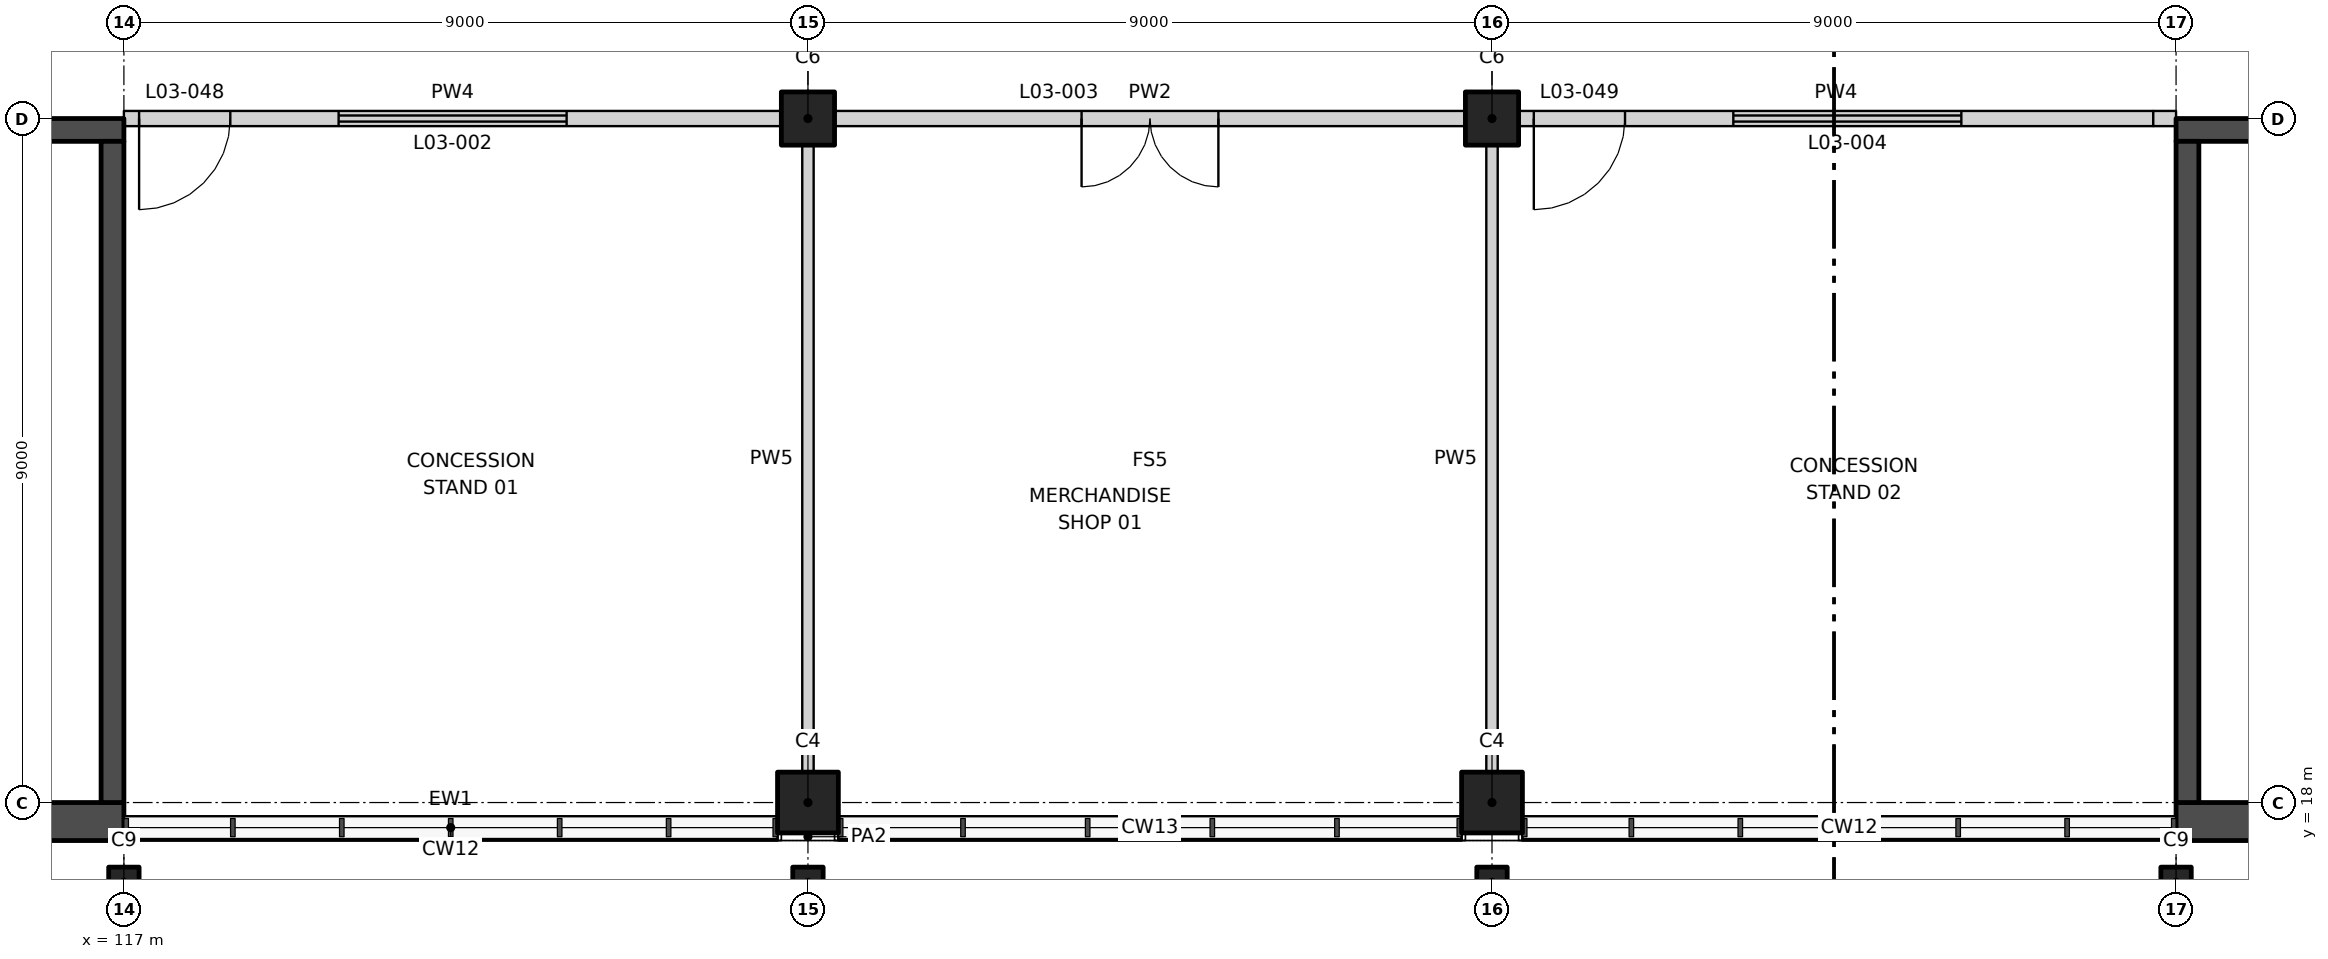
"""IFC4 building model, lengths in metres.
Left out: names, types, materials, properties, quantities, classifications, styles, units other than length and angle.
Written with IfcOpenShell. Run it as: python <this file> out.ifc"""

import sys

from ifc_helpers import new_model, si_unit, direction, frame, frame_2d, origin, origin_2d, place, context, subcontext, project, spatial, rectangle, hollow_rectangle, extrude, element, fill, save


model = new_model("IFC4")
c1 = context("Model", 3, precision=1e-05, world=origin(), true_north=direction((0.0, 1.0)))
c2 = subcontext(c1, "Body", "Model", "MODEL_VIEW")
j1 = project(units=[si_unit("LENGTHUNIT", "METRE"), si_unit("PLANEANGLEUNIT", "RADIAN")], contexts=[c1])
p1 = place(None, origin())
s1 = spatial("IfcSite", under=j1, at=p1, CompositionType="ELEMENT")
p2 = place(p1, origin())
s2 = spatial("IfcBuilding", under=s1, at=p2, CompositionType="ELEMENT")
p3 = place(p2, frame((0.0, 0.0, 22.0)))
s3 = spatial("IfcBuildingStorey", under=s2, at=p3, CompositionType="ELEMENT", Elevation=22.0)
for number, where, z_axis, x_axis in (
    (1, (126.0, 18.0, 0.0), (0.0, 0.0, 1.0), (1.0, 0.0, 0.0)),
    (2, (135.0, 18.0, 0.0), (0.0, 0.0, 1.0), (1.0, 0.0, 0.0)),
):
    element("IfcColumn", number, at=place(p3, frame(where, z_axis=z_axis, x_axis=x_axis)), inside=s3, PredefinedType="COLUMN", context=c2, shape_type="SweptSolid", body=[
        extrude(rectangle(XDim=0.8, YDim=0.8, at=origin_2d()), origin(), (0.0, 0.0, 1.0), 6.0),
    ])
for number, where, z_axis, x_axis in (
    (3, (126.0, 27.0, 0.0), (0.0, 0.0, 1.0), (1.0, 0.0, 0.0)),
    (4, (135.0, 27.0, 0.0), (0.0, 0.0, 1.0), (1.0, 0.0, 0.0)),
):
    element("IfcColumn", number, at=place(p3, frame(where, z_axis=z_axis, x_axis=x_axis)), inside=s3, PredefinedType="COLUMN", context=c2, shape_type="SweptSolid", body=[
        extrude(rectangle(XDim=0.7, YDim=0.7, at=origin_2d()), origin(), (0.0, 0.0, 1.0), 6.0),
    ])
p4 = place(p3, frame((117.0, 27.0, 0.0), z_axis=(0.0, 0.0, 1.0), x_axis=(1.0, 0.0, 0.0)))
e5 = element("IfcWall", 5, at=p4, inside=s3, PredefinedType="PARTITIONING", context=c2, shape_type="SweptSolid", body=[
    extrude(rectangle(XDim=8.65, YDim=0.2, at=frame_2d((4.325, 0.0))), origin(), (0.0, 0.0, 1.0), 4.8),
])
p5 = place(p4, frame((2.825, 0.0, 0.0)))
e6 = element("IfcOpeningElement", 6, at=p5, cuts=e5, PredefinedType="OPENING", context=c2, shape_type="SweptSolid", body=[
    extrude(rectangle(XDim=3.0, YDim=2.4, at=frame_2d((1.5, 1.2))), frame((0.0, 0.11, 0.0), z_axis=(0.0, -1.0, 0.0), x_axis=(1.0, 0.0, 0.0)), (0.0, 0.0, 1.0), 0.22),
])
p6 = place(p4, frame((0.2, 0.0, 0.0)))
e7 = element("IfcOpeningElement", 7, at=p6, cuts=e5, PredefinedType="OPENING", context=c2, shape_type="SweptSolid", body=[
    extrude(rectangle(XDim=1.2, YDim=2.1, at=frame_2d((0.6, 1.05))), frame((0.0, 0.11, 0.0), z_axis=(0.0, -1.0, 0.0), x_axis=(1.0, 0.0, 0.0)), (0.0, 0.0, 1.0), 0.22),
])
p7 = place(p3, frame((126.35, 27.0, 0.0), z_axis=(0.0, 0.0, 1.0), x_axis=(1.0, 0.0, 0.0)))
e8 = element("IfcWall", 8, at=p7, inside=s3, PredefinedType="PARTITIONING", context=c2, shape_type="SweptSolid", body=[
    extrude(rectangle(XDim=8.3, YDim=0.2, at=frame_2d((4.15, 0.0))), origin(), (0.0, 0.0, 1.0), 4.8),
])
p8 = place(p7, frame((3.25, 0.0, 0.0)))
e9 = element("IfcOpeningElement", 9, at=p8, cuts=e8, PredefinedType="OPENING", context=c2, shape_type="SweptSolid", body=[
    extrude(rectangle(XDim=1.8, YDim=2.1, at=frame_2d((0.9, 1.05))), frame((0.0, 0.11, 0.0), z_axis=(0.0, -1.0, 0.0), x_axis=(1.0, 0.0, 0.0)), (0.0, 0.0, 1.0), 0.22),
])
p9 = place(p3, frame((135.35, 27.0, 0.0), z_axis=(0.0, 0.0, 1.0), x_axis=(1.0, 0.0, 0.0)))
e10 = element("IfcWall", 10, at=p9, inside=s3, PredefinedType="PARTITIONING", context=c2, shape_type="SweptSolid", body=[
    extrude(rectangle(XDim=8.35, YDim=0.2, at=frame_2d((4.175, 0.0))), origin(), (0.0, 0.0, 1.0), 4.8),
])
p10 = place(p9, frame((2.825, 0.0, 0.0)))
e11 = element("IfcOpeningElement", 11, at=p10, cuts=e10, PredefinedType="OPENING", context=c2, shape_type="SweptSolid", body=[
    extrude(rectangle(XDim=3.0, YDim=2.4, at=frame_2d((1.5, 1.2))), frame((0.0, 0.11, 0.0), z_axis=(0.0, -1.0, 0.0), x_axis=(1.0, 0.0, 0.0)), (0.0, 0.0, 1.0), 0.22),
])
p11 = place(p9, frame((0.2, 0.0, 0.0)))
e12 = element("IfcOpeningElement", 12, at=p11, cuts=e10, PredefinedType="OPENING", context=c2, shape_type="SweptSolid", body=[
    extrude(rectangle(XDim=1.2, YDim=2.1, at=frame_2d((0.6, 1.05))), frame((0.0, 0.11, 0.0), z_axis=(0.0, -1.0, 0.0), x_axis=(1.0, 0.0, 0.0)), (0.0, 0.0, 1.0), 0.22),
])
for number, where, z_axis, x_axis in (
    (13, (126.0, 18.4, 0.0), (0.0, 0.0, 1.0), (0.0, 1.0, 0.0)),
    (14, (135.0, 18.4, 0.0), (0.0, 0.0, 1.0), (0.0, 1.0, 0.0)),
):
    element("IfcWall", number, at=place(p3, frame(where, z_axis=z_axis, x_axis=x_axis)), inside=s3, PredefinedType="PARTITIONING", context=c2, shape_type="SweptSolid", body=[
        extrude(rectangle(XDim=8.25, YDim=0.15, at=frame_2d((4.125, 0.0))), origin(), (0.0, 0.0, 1.0), 4.8),
    ])
p12 = place(p3, frame((117.0, 17.65, 0.0), z_axis=(0.0, 0.0, 1.0), x_axis=(1.0, 0.0, 0.0)))
e15 = element("IfcWall", 15, at=p12, inside=s3, PredefinedType="SOLIDWALL", context=c2, shape_type="SweptSolid", body=[
    extrude(rectangle(XDim=8.6, YDim=0.3, at=frame_2d((4.3, 0.0))), origin(), (0.0, 0.0, 1.0), 1.0),
])
p13 = place(p3, frame((126.4, 17.65, 0.0), z_axis=(0.0, 0.0, 1.0), x_axis=(1.0, 0.0, 0.0)))
e16 = element("IfcWall", 16, at=p13, inside=s3, PredefinedType="SOLIDWALL", context=c2, shape_type="SweptSolid", body=[
    extrude(rectangle(XDim=8.2, YDim=0.3, at=frame_2d((4.1, 0.0))), origin(), (0.0, 0.0, 1.0), 1.0),
])
p14 = place(p3, frame((135.4, 17.65, 0.0), z_axis=(0.0, 0.0, 1.0), x_axis=(1.0, 0.0, 0.0)))
e17 = element("IfcWall", 17, at=p14, inside=s3, PredefinedType="SOLIDWALL", context=c2, shape_type="SweptSolid", body=[
    extrude(rectangle(XDim=8.6, YDim=0.3, at=frame_2d((4.3, 0.0))), origin(), (0.0, 0.0, 1.0), 1.0),
])
for number, where, z_axis, x_axis in (
    (18, (117.0, 16.95, 0.0), (0.0, 0.0, 1.0), (1.0, 0.0, 0.0)),
    (19, (126.0, 16.95, 0.0), (0.0, 0.0, 1.0), (1.0, 0.0, 0.0)),
    (20, (135.0, 16.95, 0.0), (0.0, 0.0, 1.0), (1.0, 0.0, 0.0)),
    (21, (144.0, 16.95, 0.0), (0.0, 0.0, 1.0), (1.0, 0.0, 0.0)),
):
    element("IfcColumn", number, at=place(p3, frame(where, z_axis=z_axis, x_axis=x_axis)), inside=s3, PredefinedType="COLUMN", context=c2, shape_type="SweptSolid", body=[
        extrude(hollow_rectangle(XDim=0.4, YDim=0.4, WallThickness=0.016, at=origin_2d()), origin(), (0.0, 0.0, 1.0), 5.7),
    ])
p15 = place(p3, frame((117.0, 26.85, 0.0), z_axis=(0.0, 0.0, 1.0), x_axis=(-1.0, 0.0, 0.0)))
e22 = element("IfcWall", 22, at=p15, inside=s3, PredefinedType="SHEAR", context=c2, shape_type="SweptSolid", body=[
    extrude(rectangle(XDim=18.0, YDim=0.3, at=frame_2d((9.0, 0.0))), origin(), (0.0, 0.0, 1.0), 6.0),
])
p16 = place(p15, frame((8.6, 0.0, 0.0)))
e23 = element("IfcOpeningElement", 23, at=p16, cuts=e22, PredefinedType="OPENING", context=c2, shape_type="SweptSolid", body=[
    extrude(rectangle(XDim=1.2, YDim=2.1, at=frame_2d((0.6, 1.05))), frame((0.0, 0.16, 0.0), z_axis=(0.0, -1.0, 0.0), x_axis=(1.0, 0.0, 0.0)), (0.0, 0.0, 1.0), 0.32),
])
p17 = place(p3, frame((117.0, 17.75, 0.0), z_axis=(0.0, 0.0, 1.0), x_axis=(-1.0, 0.0, 0.0)))
e24 = element("IfcWall", 24, at=p17, inside=s3, PredefinedType="SHEAR", context=c2, shape_type="SweptSolid", body=[
    extrude(rectangle(XDim=18.0, YDim=0.5, at=frame_2d((9.0, 0.0))), origin(), (0.0, 0.0, 1.0), 6.0),
])
p18 = place(p3, frame((116.85, 26.7, 0.0), z_axis=(0.0, 0.0, 1.0), x_axis=(0.0, -1.0, 0.0)))
e25 = element("IfcWall", 25, at=p18, inside=s3, PredefinedType="SHEAR", context=c2, shape_type="SweptSolid", body=[
    extrude(rectangle(XDim=8.7, YDim=0.3, at=frame_2d((4.35, 0.0))), origin(), (0.0, 0.0, 1.0), 6.0),
])
p19 = place(p3, frame((144.0, 26.85, 0.0), z_axis=(0.0, 0.0, 1.0), x_axis=(1.0, 0.0, 0.0)))
e26 = element("IfcWall", 26, at=p19, inside=s3, PredefinedType="SHEAR", context=c2, shape_type="SweptSolid", body=[
    extrude(rectangle(XDim=18.0, YDim=0.3, at=frame_2d((9.0, 0.0))), origin(), (0.0, 0.0, 1.0), 6.0),
])
p20 = place(p19, frame((8.6, 0.0, 0.0)))
e27 = element("IfcOpeningElement", 27, at=p20, cuts=e26, PredefinedType="OPENING", context=c2, shape_type="SweptSolid", body=[
    extrude(rectangle(XDim=1.2, YDim=2.1, at=frame_2d((0.6, 1.05))), frame((0.0, 0.16, 0.0), z_axis=(0.0, -1.0, 0.0), x_axis=(1.0, 0.0, 0.0)), (0.0, 0.0, 1.0), 0.32),
])
p21 = place(p3, frame((144.0, 17.75, 0.0), z_axis=(0.0, 0.0, 1.0), x_axis=(1.0, 0.0, 0.0)))
e28 = element("IfcWall", 28, at=p21, inside=s3, PredefinedType="SHEAR", context=c2, shape_type="SweptSolid", body=[
    extrude(rectangle(XDim=18.0, YDim=0.5, at=frame_2d((9.0, 0.0))), origin(), (0.0, 0.0, 1.0), 6.0),
])
p22 = place(p3, frame((144.15, 26.7, 0.0), z_axis=(0.0, 0.0, 1.0), x_axis=(0.0, -1.0, 0.0)))
e29 = element("IfcWall", 29, at=p22, inside=s3, PredefinedType="SHEAR", context=c2, shape_type="SweptSolid", body=[
    extrude(rectangle(XDim=8.7, YDim=0.3, at=frame_2d((4.35, 0.0))), origin(), (0.0, 0.0, 1.0), 6.0),
])
p23 = place(p3, frame((143.7, 27.0, 0.0), z_axis=(0.0, 0.0, 1.0), x_axis=(1.0, 0.0, 0.0)))
e30 = element("IfcWall", 30, at=p23, inside=s3, PredefinedType="PARTITIONING", context=c2, shape_type="SweptSolid", body=[
    extrude(rectangle(XDim=0.3, YDim=0.2, at=frame_2d((0.15, 0.0))), origin(), (0.0, 0.0, 1.0), 6.0),
])
p24 = place(p5, origin())
e31 = element("IfcDoor", 31, at=p24, inside=s3, OperationType="ROLLINGUP", PredefinedType="DOOR", context=c2, shape_type="SweptSolid", body=[
    extrude(rectangle(XDim=3.0, YDim=2.4, at=frame_2d((1.5, 1.2))), frame((0.0, 0.025, 0.0), z_axis=(0.0, -1.0, 0.0), x_axis=(1.0, 0.0, 0.0)), (0.0, 0.0, 1.0), 0.05),
])
fill(e6, e31)
p25 = place(p8, frame((1.8, 0.0, 0.0), z_axis=(0.0, 0.0, 1.0), x_axis=(-1.0, 0.0, 0.0)))
e32 = element("IfcDoor", 32, at=p25, inside=s3, OperationType="DOUBLE_DOOR_DOUBLE_SWING", PredefinedType="DOOR", context=c2, shape_type="SweptSolid", body=[
    extrude(rectangle(XDim=1.8, YDim=2.1, at=frame_2d((0.9, 1.05))), frame((0.0, 0.025, 0.0), z_axis=(0.0, -1.0, 0.0), x_axis=(1.0, 0.0, 0.0)), (0.0, 0.0, 1.0), 0.05),
])
fill(e9, e32)
p26 = place(p10, origin())
e33 = element("IfcDoor", 33, at=p26, inside=s3, OperationType="ROLLINGUP", PredefinedType="DOOR", context=c2, shape_type="SweptSolid", body=[
    extrude(rectangle(XDim=3.0, YDim=2.4, at=frame_2d((1.5, 1.2))), frame((0.0, 0.025, 0.0), z_axis=(0.0, -1.0, 0.0), x_axis=(1.0, 0.0, 0.0)), (0.0, 0.0, 1.0), 0.05),
])
fill(e11, e33)
p27 = place(p6, frame((1.2, 0.0, 0.0), z_axis=(0.0, 0.0, 1.0), x_axis=(-1.0, 0.0, 0.0)))
e34 = element("IfcDoor", 34, at=p27, inside=s3, OperationType="SINGLE_SWING_RIGHT", PredefinedType="DOOR", context=c2, shape_type="SweptSolid", body=[
    extrude(rectangle(XDim=1.2, YDim=2.1, at=frame_2d((0.6, 1.05))), frame((0.0, 0.025, 0.0), z_axis=(0.0, -1.0, 0.0), x_axis=(1.0, 0.0, 0.0)), (0.0, 0.0, 1.0), 0.05),
])
fill(e7, e34)
p28 = place(p11, frame((1.2, 0.0, 0.0), z_axis=(0.0, 0.0, 1.0), x_axis=(-1.0, 0.0, 0.0)))
e35 = element("IfcDoor", 35, at=p28, inside=s3, OperationType="SINGLE_SWING_RIGHT", PredefinedType="DOOR", context=c2, shape_type="SweptSolid", body=[
    extrude(rectangle(XDim=1.2, YDim=2.1, at=frame_2d((0.6, 1.05))), frame((0.0, 0.025, 0.0), z_axis=(0.0, -1.0, 0.0), x_axis=(1.0, 0.0, 0.0)), (0.0, 0.0, 1.0), 0.05),
])
fill(e12, e35)
save(model, sys.argv[1])
